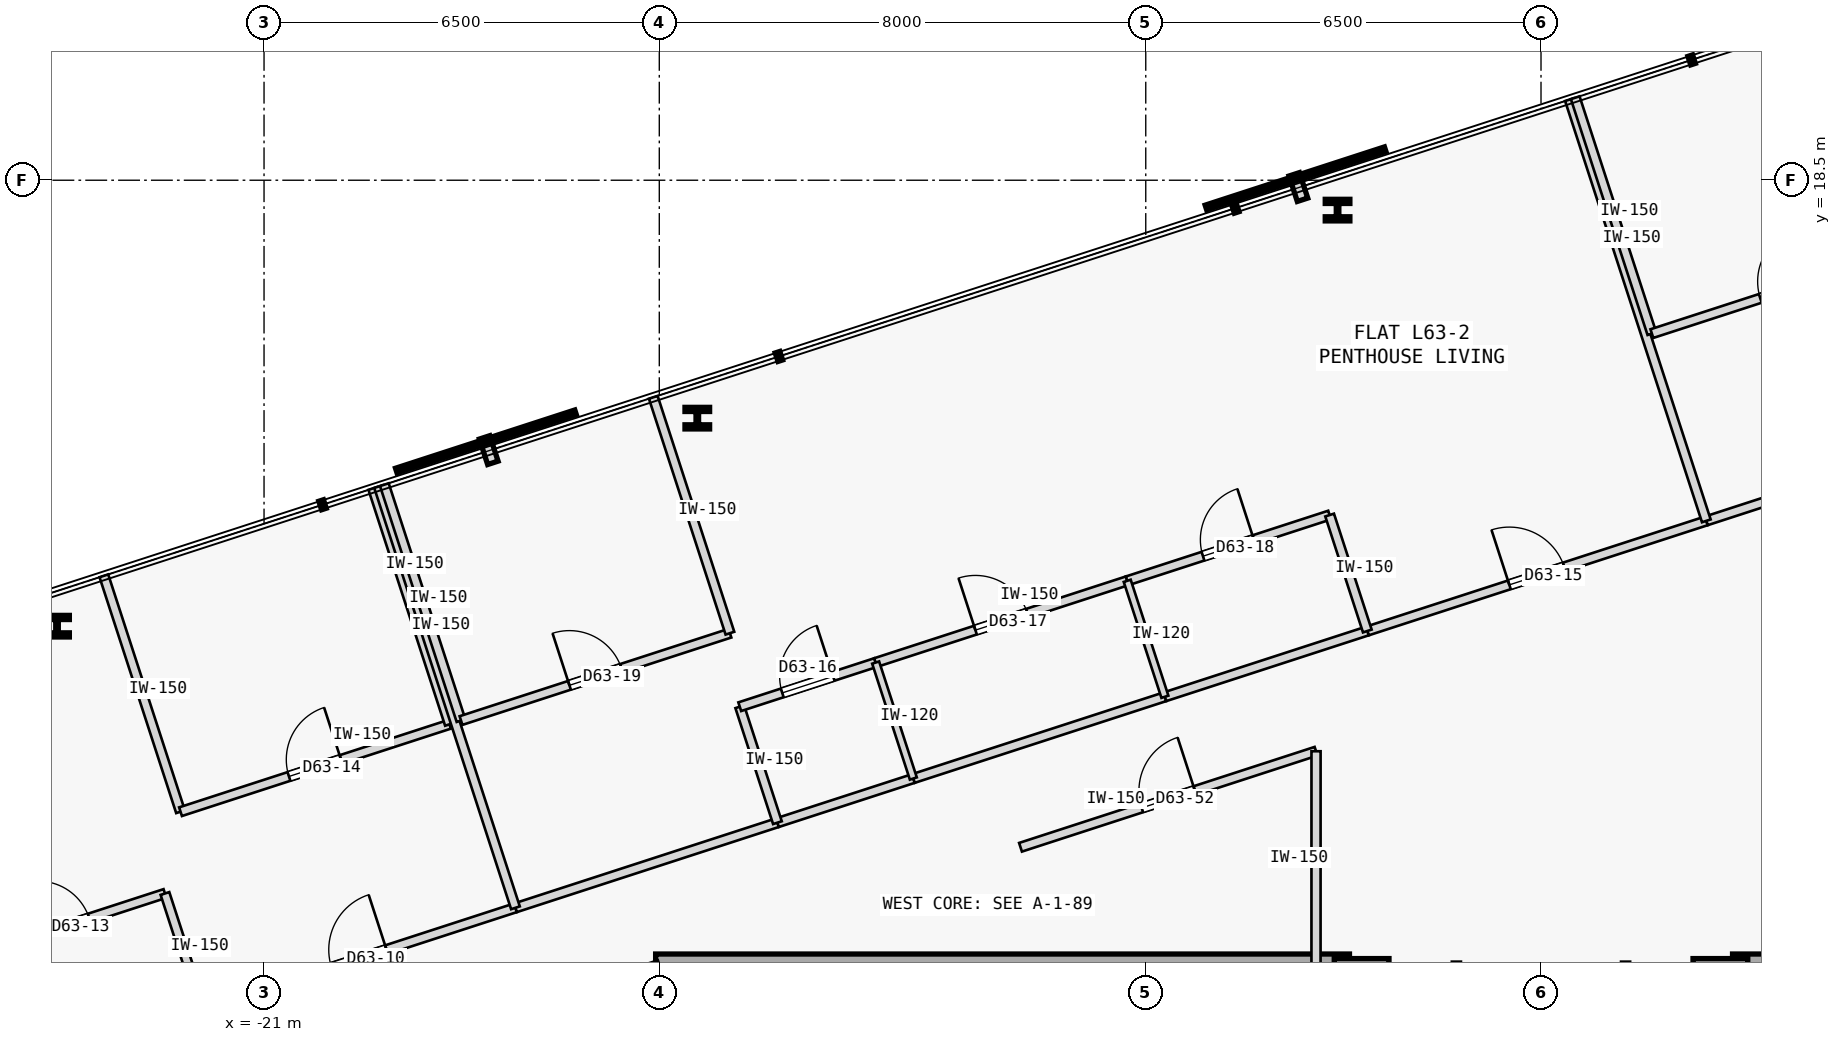
"""IFC4 building model, lengths in metres.
Left out: names, types, materials, properties, quantities, classifications, styles, units other than length and angle.
Written with IfcOpenShell. Run it as: python <this file> out.ifc"""

import sys

from ifc_helpers import new_model, si_unit, direction, frame, frame_2d, origin, origin_2d, place, context, subcontext, project, spatial, rectangle, i_section, extrude, element, fill, save


model = new_model("IFC4")
c1 = context("Model", 3, precision=1e-05, world=origin(), true_north=direction((0.0, 1.0)))
c2 = subcontext(c1, "Body", "Model", "MODEL_VIEW")
j1 = project(units=[si_unit("LENGTHUNIT", "METRE"), si_unit("PLANEANGLEUNIT", "RADIAN")], contexts=[c1])
p1 = place(None, origin())
s1 = spatial("IfcSite", under=j1, at=p1, CompositionType="ELEMENT")
p2 = place(p1, origin())
s2 = spatial("IfcBuilding", under=s1, at=p2, CompositionType="ELEMENT")
p3 = place(p2, frame((0.0, 0.0, 237.7)))
s3 = spatial("IfcBuildingStorey", under=s2, at=p3, CompositionType="ELEMENT", Elevation=237.7)
for number, where, z_axis, x_axis in (
    (1, (-2.95, 5.25, 0.0), (0.0, 0.0, 1.0), (1.0, 0.0, 0.0)),
    (2, (2.95, 5.25, 0.0), (0.0, 0.0, 1.0), (1.0, 0.0, 0.0)),
):
    element("IfcColumn", number, at=place(p3, frame(where, z_axis=z_axis, x_axis=x_axis)), inside=s3, PredefinedType="COLUMN", context=c2, shape_type="SweptSolid", body=[
        extrude(rectangle(XDim=0.9, YDim=0.9, at=origin_2d()), origin(), (0.0, 0.0, 1.0), 3.35),
    ])
for number, where, z_axis, x_axis in (
    (3, (-14.56, 5.6, 0.0), (0.0, 0.0, 1.0), (1.0, 0.0, 0.0)),
    (4, (3.15, 5.6, 0.0), (0.0, 0.0, 1.0), (1.0, 0.0, 0.0)),
):
    element("IfcWall", number, at=place(p3, frame(where, z_axis=z_axis, x_axis=x_axis)), inside=s3, PredefinedType="SHEAR", context=c2, shape_type="SweptSolid", body=[
        extrude(rectangle(XDim=11.41, YDim=0.35, at=frame_2d((5.705, 0.0))), origin(), (0.0, 0.0, 1.0), 3.125),
    ])
for number, where, z_axis, x_axis in (
    (5, (-3.346, 18.009, 0.0), (0.0, 0.0, 1.0), (1.0, 0.0, 0.0)),
    (6, (-13.875, 14.587, 0.0), (0.0, 0.0, 1.0), (1.0, 0.0, 0.0)),
    (7, (-24.404, 11.166, 0.0), (0.0, 0.0, 1.0), (1.0, 0.0, 0.0)),
):
    element("IfcColumn", number, at=place(p3, frame(where, z_axis=z_axis, x_axis=x_axis)), inside=s3, PredefinedType="COLUMN", context=c2, shape_type="SweptSolid", body=[
        extrude(i_section(OverallWidth=0.405, OverallDepth=0.355, WebThickness=0.042, FlangeThickness=0.068, FilletRadius=0.015, at=origin_2d()), origin(), (0.0, 0.0, 1.0), 3.35),
    ])
p4 = place(p3, frame((-1.391, -5.65, 0.0), z_axis=(0.0, 0.0, 1.0), x_axis=(-8.6422954e-05, 0.999999996266, 0.0)))
e8 = element("IfcWall", 8, at=p4, inside=s3, PredefinedType="PARTITIONING", context=c2, shape_type="SweptSolid", body=[
    extrude(rectangle(XDim=11.3, YDim=0.15, at=frame_2d((5.65, 0.0))), origin(), (0.0, 0.0, 1.0), 3.125),
])
p5 = place(p4, frame((5.175, 0.0, 0.0)))
e9 = element("IfcOpeningElement", 9, at=p5, cuts=e8, PredefinedType="OPENING", context=c2, shape_type="SweptSolid", body=[
    extrude(rectangle(XDim=0.95, YDim=2.15, at=frame_2d((0.475, 1.075))), frame((0.0, 0.085, 0.0), z_axis=(0.0, -1.0, 0.0), x_axis=(1.0, 0.0, 0.0)), (0.0, 0.0, 1.0), 0.17),
])
p6 = place(p3, frame((1.391, -5.648, 0.0), z_axis=(0.0, 0.0, 1.0), x_axis=(-4.3218947e-05, 0.999999999066, 0.0)))
e10 = element("IfcWall", 10, at=p6, inside=s3, PredefinedType="PARTITIONING", context=c2, shape_type="SweptSolid", body=[
    extrude(rectangle(XDim=11.298, YDim=0.15, at=frame_2d((5.649, 0.0))), origin(), (0.0, 0.0, 1.0), 3.125),
])
p7 = place(p3, frame((-22.01, 4.864, 0.0), z_axis=(0.0, 0.0, 1.0), x_axis=(0.951061595649, 0.309001361293, 0.0)))
e11 = element("IfcWall", 11, at=p7, inside=s3, PredefinedType="PARTITIONING", context=c2, shape_type="SweptSolid", body=[
    extrude(rectangle(XDim=5.409, YDim=0.15, at=frame_2d((2.705, 0.0))), origin(), (0.0, 0.0, 1.0), 3.125),
])
p8 = place(p7, frame((2.229, 0.0, 0.0)))
e12 = element("IfcOpeningElement", 12, at=p8, cuts=e11, PredefinedType="OPENING", context=c2, shape_type="SweptSolid", body=[
    extrude(rectangle(XDim=0.95, YDim=2.15, at=frame_2d((0.475, 1.075))), frame((0.0, 0.085, 0.0), z_axis=(0.0, -1.0, 0.0), x_axis=(1.0, 0.0, 0.0)), (0.0, 0.0, 1.0), 0.17),
])
p9 = place(p3, frame((-16.865, 6.535, 0.0), z_axis=(0.0, 0.0, 1.0), x_axis=(0.951049118272, 0.309039762222, 0.0)))
e13 = element("IfcWall", 13, at=p9, inside=s3, PredefinedType="PARTITIONING", context=c2, shape_type="SweptSolid", body=[
    extrude(rectangle(XDim=4.53, YDim=0.15, at=frame_2d((2.265, 0.0))), origin(), (0.0, 0.0, 1.0), 3.125),
])
p10 = place(p3, frame((-2.856, 11.087, 0.0), z_axis=(0.0, 0.0, 1.0), x_axis=(0.95106314138, 0.308996603718, 0.0)))
e14 = element("IfcWall", 14, at=p10, inside=s3, PredefinedType="PARTITIONING", context=c2, shape_type="SweptSolid", body=[
    extrude(rectangle(XDim=5.862, YDim=0.15, at=frame_2d((2.931, 0.0))), origin(), (0.0, 0.0, 1.0), 3.125),
])
p11 = place(p10, frame((2.456, 0.0, 0.0)))
e15 = element("IfcOpeningElement", 15, at=p11, cuts=e14, PredefinedType="OPENING", context=c2, shape_type="SweptSolid", body=[
    extrude(rectangle(XDim=0.95, YDim=2.15, at=frame_2d((0.475, 1.075))), frame((0.0, 0.085, 0.0), z_axis=(0.0, -1.0, 0.0), x_axis=(1.0, 0.0, 0.0)), (0.0, 0.0, 1.0), 0.17),
])
p12 = place(p3, frame((-12.557, 7.935, 0.0), z_axis=(0.0, 0.0, 1.0), x_axis=(0.951045519245, 0.309050837767, 0.0)))
e16 = element("IfcWall", 16, at=p12, inside=s3, PredefinedType="PARTITIONING", context=c2, shape_type="SweptSolid", body=[
    extrude(rectangle(XDim=2.35, YDim=0.15, at=frame_2d((1.175, 0.0))), origin(), (0.0, 0.0, 1.0), 3.125),
])
p13 = place(p3, frame((-10.322, 8.661, 0.0), z_axis=(0.0, 0.0, 1.0), x_axis=(0.951052627573, 0.309028962374, 0.0)))
e17 = element("IfcWall", 17, at=p13, inside=s3, PredefinedType="PARTITIONING", context=c2, shape_type="SweptSolid", body=[
    extrude(rectangle(XDim=4.35, YDim=0.15, at=frame_2d((2.175, 0.0))), origin(), (0.0, 0.0, 1.0), 3.125),
])
p14 = place(p3, frame((-6.185, 10.006, 0.0), z_axis=(0.0, 0.0, 1.0), x_axis=(0.951062257173, 0.308999325213, 0.0)))
e18 = element("IfcWall", 18, at=p14, inside=s3, PredefinedType="PARTITIONING", context=c2, shape_type="SweptSolid", body=[
    extrude(rectangle(XDim=3.5, YDim=0.15, at=frame_2d((1.75, 0.0))), origin(), (0.0, 0.0, 1.0), 3.125),
])
p15 = place(p3, frame((2.719, 12.898, 0.0), z_axis=(0.0, 0.0, 1.0), x_axis=(0.951053341802, 0.309026764289, 0.0)))
e19 = element("IfcWall", 19, at=p15, inside=s3, PredefinedType="PARTITIONING", context=c2, shape_type="SweptSolid", body=[
    extrude(rectangle(XDim=4.654, YDim=0.15, at=frame_2d((2.327, 0.0))), origin(), (0.0, 0.0, 1.0), 3.125),
])
p16 = place(p3, frame((-17.792, 4.531, 0.0), z_axis=(0.0, 0.0, 1.0), x_axis=(0.951047546178, 0.309044600193, 0.0)))
e20 = element("IfcWall", 20, at=p16, inside=s3, PredefinedType="PARTITIONING", context=c2, shape_type="SweptSolid", body=[
    extrude(rectangle(XDim=3.461, YDim=0.15, at=frame_2d((1.73, 0.0))), origin(), (0.0, 0.0, 1.0), 3.125),
])
p17 = place(p16, frame((0.302, 0.0, 0.0)))
e21 = element("IfcOpeningElement", 21, at=p17, cuts=e20, PredefinedType="OPENING", context=c2, shape_type="SweptSolid", body=[
    extrude(rectangle(XDim=0.92, YDim=2.15, at=frame_2d((0.46, 1.075))), frame((0.0, 0.085, 0.0), z_axis=(0.0, -1.0, 0.0), x_axis=(1.0, 0.0, 0.0)), (0.0, 0.0, 1.0), 0.17),
])
p18 = place(p3, frame((-8.56, 7.531, 0.0), z_axis=(0.0, 0.0, 1.0), x_axis=(0.951054430751, 0.309023412946, 0.0)))
e22 = element("IfcWall", 22, at=p18, inside=s3, PredefinedType="PARTITIONING", context=c2, shape_type="SweptSolid", body=[
    extrude(rectangle(XDim=5.11, YDim=0.15, at=frame_2d((2.555, 0.0))), origin(), (0.0, 0.0, 1.0), 3.125),
])
p19 = place(p18, frame((2.095, 0.0, 0.0)))
e23 = element("IfcOpeningElement", 23, at=p19, cuts=e22, PredefinedType="OPENING", context=c2, shape_type="SweptSolid", body=[
    extrude(rectangle(XDim=0.92, YDim=2.15, at=frame_2d((0.46, 1.075))), frame((0.0, 0.085, 0.0), z_axis=(0.0, -1.0, 0.0), x_axis=(1.0, 0.0, 0.0)), (0.0, 0.0, 1.0), 0.17),
])
p20 = place(p3, frame((-3.7, 5.6, 0.0), z_axis=(0.0, 0.0, 1.0), x_axis=(0.000139120755, 0.999999990323, 0.0)))
e24 = element("IfcWall", 24, at=p20, inside=s3, PredefinedType="PARTITIONING", context=c2, shape_type="SweptSolid", body=[
    extrude(rectangle(XDim=3.51, YDim=0.15, at=frame_2d((1.755, 0.0))), origin(), (0.0, 0.0, 1.0), 3.125),
])
p21 = place(p3, frame((-25.958, 5.689, 0.0), z_axis=(0.0, 0.0, 1.0), x_axis=(0.951076095932, 0.308956727951, 0.0)))
e25 = element("IfcWall", 25, at=p21, inside=s3, PredefinedType="PARTITIONING", context=c2, shape_type="SweptSolid", body=[
    extrude(rectangle(XDim=3.5, YDim=0.15, at=frame_2d((1.75, 0.0))), origin(), (0.0, 0.0, 1.0), 3.125),
])
p22 = place(p21, frame((1.31, 0.0, 0.0)))
e26 = element("IfcOpeningElement", 26, at=p22, cuts=e25, PredefinedType="OPENING", context=c2, shape_type="SweptSolid", body=[
    extrude(rectangle(XDim=0.88, YDim=2.15, at=frame_2d((0.44, 1.075))), frame((0.0, 0.085, 0.0), z_axis=(0.0, -1.0, 0.0), x_axis=(1.0, 0.0, 0.0)), (0.0, 0.0, 1.0), 0.17),
])
p23 = place(p3, frame((-22.01, 4.864, 0.0), z_axis=(0.0, 0.0, 1.0), x_axis=(-0.309058537449, 0.951043017129, 0.0)))
e27 = element("IfcWall", 27, at=p23, inside=s3, PredefinedType="PARTITIONING", context=c2, shape_type="SweptSolid", body=[
    extrude(rectangle(XDim=2.005, YDim=0.15, at=frame_2d((1.002, 0.0))), origin(), (0.0, 0.0, 1.0), 3.125),
])
p24 = place(p3, frame((-22.374, 8.115, 0.0), z_axis=(0.0, 0.0, 1.0), x_axis=(-0.308964264858, 0.951073647538, 0.0)))
e28 = element("IfcWall", 28, at=p24, inside=s3, PredefinedType="PARTITIONING", context=c2, shape_type="SweptSolid", body=[
    extrude(rectangle(XDim=4.079, YDim=0.15, at=frame_2d((2.04, 0.0))), origin(), (0.0, 0.0, 1.0), 3.125),
])
p25 = place(p3, frame((-22.374, 8.115, 0.0), z_axis=(0.0, 0.0, 1.0), x_axis=(0.951055286502, 0.309020779263, 0.0)))
e29 = element("IfcWall", 29, at=p25, inside=s3, PredefinedType="PARTITIONING", context=c2, shape_type="SweptSolid", body=[
    extrude(rectangle(XDim=4.65, YDim=0.15, at=frame_2d((2.325, 0.0))), origin(), (0.0, 0.0, 1.0), 3.125),
])
p26 = place(p25, frame((1.875, 0.0, 0.0)))
e30 = element("IfcOpeningElement", 30, at=p26, cuts=e29, PredefinedType="OPENING", context=c2, shape_type="SweptSolid", body=[
    extrude(rectangle(XDim=0.9, YDim=2.15, at=frame_2d((0.45, 1.075))), frame((0.0, 0.085, 0.0), z_axis=(0.0, -1.0, 0.0), x_axis=(1.0, 0.0, 0.0)), (0.0, 0.0, 1.0), 0.17),
])
p27 = place(p3, frame((-17.951, 9.552, 0.0), z_axis=(0.0, 0.0, 1.0), x_axis=(-0.309018403393, 0.951056058476, 0.0)))
e31 = element("IfcWall", 31, at=p27, inside=s3, PredefinedType="PARTITIONING", context=c2, shape_type="SweptSolid", body=[
    extrude(rectangle(XDim=4.079, YDim=0.15, at=frame_2d((2.04, 0.0))), origin(), (0.0, 0.0, 1.0), 3.125),
])
p28 = place(p3, frame((-16.865, 6.535, 0.0), z_axis=(0.0, 0.0, 1.0), x_axis=(-0.309029230739, 0.951052540372, 0.0)))
e32 = element("IfcWall", 32, at=p28, inside=s3, PredefinedType="PARTITIONING", context=c2, shape_type="SweptSolid", body=[
    extrude(rectangle(XDim=7.284, YDim=0.15, at=frame_2d((3.642, 0.0))), origin(), (0.0, 0.0, 1.0), 3.125),
])
p29 = place(p3, frame((-12.557, 7.935, 0.0), z_axis=(0.0, 0.0, 1.0), x_axis=(-0.308912611775, 0.951090425925, 0.0)))
e33 = element("IfcWall", 33, at=p29, inside=s3, PredefinedType="PARTITIONING", context=c2, shape_type="SweptSolid", body=[
    extrude(rectangle(XDim=2.005, YDim=0.15, at=frame_2d((1.002, 0.0))), origin(), (0.0, 0.0, 1.0), 3.125),
])
p30 = place(p3, frame((-13.177, 9.842, 0.0), z_axis=(0.0, 0.0, 1.0), x_axis=(0.951066131077, 0.308987401554, 0.0)))
e34 = element("IfcWall", 34, at=p30, inside=s3, PredefinedType="PARTITIONING", context=c2, shape_type="SweptSolid", body=[
    extrude(rectangle(XDim=2.35, YDim=0.15, at=frame_2d((1.175, 0.0))), origin(), (0.0, 0.0, 1.0), 3.125),
])
p31 = place(p30, frame((0.735, 0.0, 0.0)))
e35 = element("IfcOpeningElement", 35, at=p31, cuts=e34, PredefinedType="OPENING", context=c2, shape_type="SweptSolid", body=[
    extrude(rectangle(XDim=0.88, YDim=2.15, at=frame_2d((0.44, 1.075))), frame((0.0, 0.085, 0.0), z_axis=(0.0, -1.0, 0.0), x_axis=(1.0, 0.0, 0.0)), (0.0, 0.0, 1.0), 0.17),
])
p32 = place(p3, frame((-10.942, 10.568, 0.0), z_axis=(0.0, 0.0, 1.0), x_axis=(0.951057987102, 0.309012467661, 0.0)))
e36 = element("IfcWall", 36, at=p32, inside=s3, PredefinedType="PARTITIONING", context=c2, shape_type="SweptSolid", body=[
    extrude(rectangle(XDim=4.35, YDim=0.15, at=frame_2d((2.175, 0.0))), origin(), (0.0, 0.0, 1.0), 3.125),
])
p33 = place(p32, frame((1.725, 0.0, 0.0)))
e37 = element("IfcOpeningElement", 37, at=p33, cuts=e36, PredefinedType="OPENING", context=c2, shape_type="SweptSolid", body=[
    extrude(rectangle(XDim=0.9, YDim=2.15, at=frame_2d((0.45, 1.075))), frame((0.0, 0.085, 0.0), z_axis=(0.0, -1.0, 0.0), x_axis=(1.0, 0.0, 0.0)), (0.0, 0.0, 1.0), 0.17),
])
p34 = place(p3, frame((-6.805, 11.912, 0.0), z_axis=(0.0, 0.0, 1.0), x_axis=(0.951055596592, 0.309019824916, 0.0)))
e38 = element("IfcWall", 38, at=p34, inside=s3, PredefinedType="PARTITIONING", context=c2, shape_type="SweptSolid", body=[
    extrude(rectangle(XDim=3.5, YDim=0.15, at=frame_2d((1.75, 0.0))), origin(), (0.0, 0.0, 1.0), 3.125),
])
p35 = place(p34, frame((1.31, 0.0, 0.0)))
e39 = element("IfcOpeningElement", 39, at=p35, cuts=e38, PredefinedType="OPENING", context=c2, shape_type="SweptSolid", body=[
    extrude(rectangle(XDim=0.88, YDim=2.15, at=frame_2d((0.44, 1.075))), frame((0.0, 0.085, 0.0), z_axis=(0.0, -1.0, 0.0), x_axis=(1.0, 0.0, 0.0)), (0.0, 0.0, 1.0), 0.17),
])
p36 = place(p3, frame((-2.856, 11.087, 0.0), z_axis=(0.0, 0.0, 1.0), x_axis=(-0.309058537449, 0.951043017129, 0.0)))
e40 = element("IfcWall", 40, at=p36, inside=s3, PredefinedType="PARTITIONING", context=c2, shape_type="SweptSolid", body=[
    extrude(rectangle(XDim=2.005, YDim=0.15, at=frame_2d((1.002, 0.0))), origin(), (0.0, 0.0, 1.0), 3.125),
])
p37 = place(p3, frame((-17.761, 9.614, 0.0), z_axis=(0.0, 0.0, 1.0), x_axis=(-0.309018403393, 0.951056058476, 0.0)))
e41 = element("IfcWall", 41, at=p37, inside=s3, PredefinedType="PARTITIONING", context=c2, shape_type="SweptSolid", body=[
    extrude(rectangle(XDim=4.079, YDim=0.15, at=frame_2d((2.04, 0.0))), origin(), (0.0, 0.0, 1.0), 3.125),
])
p38 = place(p3, frame((-17.761, 9.614, 0.0), z_axis=(0.0, 0.0, 1.0), x_axis=(0.951050272606, 0.309036209813, 0.0)))
e42 = element("IfcWall", 42, at=p38, inside=s3, PredefinedType="PARTITIONING", context=c2, shape_type="SweptSolid", body=[
    extrude(rectangle(XDim=4.65, YDim=0.15, at=frame_2d((2.325, 0.0))), origin(), (0.0, 0.0, 1.0), 3.125),
])
p39 = place(p38, frame((1.875, 0.0, 0.0)))
e43 = element("IfcOpeningElement", 43, at=p39, cuts=e42, PredefinedType="OPENING", context=c2, shape_type="SweptSolid", body=[
    extrude(rectangle(XDim=0.9, YDim=2.15, at=frame_2d((0.45, 1.075))), frame((0.0, 0.085, 0.0), z_axis=(0.0, -1.0, 0.0), x_axis=(1.0, 0.0, 0.0)), (0.0, 0.0, 1.0), 0.17),
])
p40 = place(p3, frame((-13.338, 11.051, 0.0), z_axis=(0.0, 0.0, 1.0), x_axis=(-0.309018403393, 0.951056058476, 0.0)))
e44 = element("IfcWall", 44, at=p40, inside=s3, PredefinedType="PARTITIONING", context=c2, shape_type="SweptSolid", body=[
    extrude(rectangle(XDim=4.079, YDim=0.15, at=frame_2d((2.04, 0.0))), origin(), (0.0, 0.0, 1.0), 3.125),
])
p41 = place(p3, frame((2.719, 12.898, 0.0), z_axis=(0.0, 0.0, 1.0), x_axis=(-0.308998913866, 0.951062390819, 0.0)))
e45 = element("IfcWall", 45, at=p41, inside=s3, PredefinedType="PARTITIONING", context=c2, shape_type="SweptSolid", body=[
    extrude(rectangle(XDim=7.284, YDim=0.15, at=frame_2d((3.642, 0.0))), origin(), (0.0, 0.0, 1.0), 3.125),
])
for number, where, z_axis, x_axis in (
    (46, (-10.322, 8.661, 0.0), (0.0, 0.0, 1.0), (-0.309, 0.951, 0.0)),
    (47, (-6.185, 10.006, 0.0), (0.0, 0.0, 1.0), (-0.309, 0.951, 0.0)),
):
    element("IfcWall", number, at=place(p3, frame(where, z_axis=z_axis, x_axis=x_axis)), inside=s3, PredefinedType="PARTITIONING", context=c2, shape_type="SweptSolid", body=[
        extrude(rectangle(XDim=2.005, YDim=0.12, at=frame_2d((1.002, 0.0))), origin(), (0.0, 0.0, 1.0), 3.125),
    ])
p42 = place(p3, frame((1.823, 15.978, 0.0), z_axis=(0.0, 0.0, 1.0), x_axis=(-0.309018403393, 0.951056058476, 0.0)))
e48 = element("IfcWall", 48, at=p42, inside=s3, PredefinedType="PARTITIONING", context=c2, shape_type="SweptSolid", body=[
    extrude(rectangle(XDim=4.079, YDim=0.15, at=frame_2d((2.04, 0.0))), origin(), (0.0, 0.0, 1.0), 3.125),
])
p43 = place(p3, frame((1.823, 15.978, 0.0), z_axis=(0.0, 0.0, 1.0), x_axis=(0.951050272606, 0.309036209813, 0.0)))
e49 = element("IfcWall", 49, at=p43, inside=s3, PredefinedType="PARTITIONING", context=c2, shape_type="SweptSolid", body=[
    extrude(rectangle(XDim=4.65, YDim=0.15, at=frame_2d((2.325, 0.0))), origin(), (0.0, 0.0, 1.0), 3.125),
])
p44 = place(p43, frame((1.875, 0.0, 0.0)))
e50 = element("IfcOpeningElement", 50, at=p44, cuts=e49, PredefinedType="OPENING", context=c2, shape_type="SweptSolid", body=[
    extrude(rectangle(XDim=0.9, YDim=2.15, at=frame_2d((0.45, 1.075))), frame((0.0, 0.085, 0.0), z_axis=(0.0, -1.0, 0.0), x_axis=(1.0, 0.0, 0.0)), (0.0, 0.0, 1.0), 0.17),
])
p45 = place(p8, origin())
e51 = element("IfcDoor", 51, at=p45, inside=s3, OperationType="SINGLE_SWING_RIGHT", PredefinedType="DOOR", context=c2, shape_type="SweptSolid", body=[
    extrude(rectangle(XDim=0.95, YDim=2.15, at=frame_2d((0.475, 1.075))), frame((0.0, 0.025, 0.0), z_axis=(0.0, -1.0, 0.0), x_axis=(1.0, 0.0, 0.0)), (0.0, 0.0, 1.0), 0.05),
])
fill(e12, e51)
p46 = place(p22, origin())
e52 = element("IfcDoor", 52, at=p46, inside=s3, OperationType="SINGLE_SWING_LEFT", PredefinedType="DOOR", context=c2, shape_type="SweptSolid", body=[
    extrude(rectangle(XDim=0.88, YDim=2.15, at=frame_2d((0.44, 1.075))), frame((0.0, 0.025, 0.0), z_axis=(0.0, -1.0, 0.0), x_axis=(1.0, 0.0, 0.0)), (0.0, 0.0, 1.0), 0.05),
])
fill(e26, e52)
p47 = place(p26, origin())
e53 = element("IfcDoor", 53, at=p47, inside=s3, OperationType="SINGLE_SWING_RIGHT", PredefinedType="DOOR", context=c2, shape_type="SweptSolid", body=[
    extrude(rectangle(XDim=0.9, YDim=2.15, at=frame_2d((0.45, 1.075))), frame((0.0, 0.025, 0.0), z_axis=(0.0, -1.0, 0.0), x_axis=(1.0, 0.0, 0.0)), (0.0, 0.0, 1.0), 0.05),
])
fill(e30, e53)
p48 = place(p11, origin())
e54 = element("IfcDoor", 54, at=p48, inside=s3, OperationType="SINGLE_SWING_LEFT", PredefinedType="DOOR", context=c2, shape_type="SweptSolid", body=[
    extrude(rectangle(XDim=0.95, YDim=2.15, at=frame_2d((0.475, 1.075))), frame((0.0, 0.025, 0.0), z_axis=(0.0, -1.0, 0.0), x_axis=(1.0, 0.0, 0.0)), (0.0, 0.0, 1.0), 0.05),
])
fill(e15, e54)
p49 = place(p31, origin())
e55 = element("IfcDoor", 55, at=p49, inside=s3, OperationType="SINGLE_SWING_RIGHT", PredefinedType="DOOR", context=c2, shape_type="SweptSolid", body=[
    extrude(rectangle(XDim=0.88, YDim=2.15, at=frame_2d((0.44, 1.075))), frame((0.0, 0.025, 0.0), z_axis=(0.0, -1.0, 0.0), x_axis=(1.0, 0.0, 0.0)), (0.0, 0.0, 1.0), 0.05),
])
fill(e35, e55)
p50 = place(p33, origin())
e56 = element("IfcDoor", 56, at=p50, inside=s3, OperationType="SINGLE_SWING_LEFT", PredefinedType="DOOR", context=c2, shape_type="SweptSolid", body=[
    extrude(rectangle(XDim=0.9, YDim=2.15, at=frame_2d((0.45, 1.075))), frame((0.0, 0.025, 0.0), z_axis=(0.0, -1.0, 0.0), x_axis=(1.0, 0.0, 0.0)), (0.0, 0.0, 1.0), 0.05),
])
fill(e37, e56)
p51 = place(p35, origin())
e57 = element("IfcDoor", 57, at=p51, inside=s3, OperationType="SINGLE_SWING_RIGHT", PredefinedType="DOOR", context=c2, shape_type="SweptSolid", body=[
    extrude(rectangle(XDim=0.88, YDim=2.15, at=frame_2d((0.44, 1.075))), frame((0.0, 0.025, 0.0), z_axis=(0.0, -1.0, 0.0), x_axis=(1.0, 0.0, 0.0)), (0.0, 0.0, 1.0), 0.05),
])
fill(e39, e57)
p52 = place(p39, origin())
e58 = element("IfcDoor", 58, at=p52, inside=s3, OperationType="SINGLE_SWING_LEFT", PredefinedType="DOOR", context=c2, shape_type="SweptSolid", body=[
    extrude(rectangle(XDim=0.9, YDim=2.15, at=frame_2d((0.45, 1.075))), frame((0.0, 0.025, 0.0), z_axis=(0.0, -1.0, 0.0), x_axis=(1.0, 0.0, 0.0)), (0.0, 0.0, 1.0), 0.05),
])
fill(e43, e58)
p53 = place(p44, origin())
e59 = element("IfcDoor", 59, at=p53, inside=s3, OperationType="SINGLE_SWING_RIGHT", PredefinedType="DOOR", context=c2, shape_type="SweptSolid", body=[
    extrude(rectangle(XDim=0.9, YDim=2.15, at=frame_2d((0.45, 1.075))), frame((0.0, 0.025, 0.0), z_axis=(0.0, -1.0, 0.0), x_axis=(1.0, 0.0, 0.0)), (0.0, 0.0, 1.0), 0.05),
])
fill(e50, e59)
p54 = place(p19, origin())
e60 = element("IfcDoor", 60, at=p54, inside=s3, OperationType="SINGLE_SWING_RIGHT", PredefinedType="DOOR", context=c2, shape_type="SweptSolid", body=[
    extrude(rectangle(XDim=0.92, YDim=2.15, at=frame_2d((0.46, 1.075))), frame((0.0, 0.025, 0.0), z_axis=(0.0, -1.0, 0.0), x_axis=(1.0, 0.0, 0.0)), (0.0, 0.0, 1.0), 0.05),
])
fill(e23, e60)
save(model, sys.argv[1])
